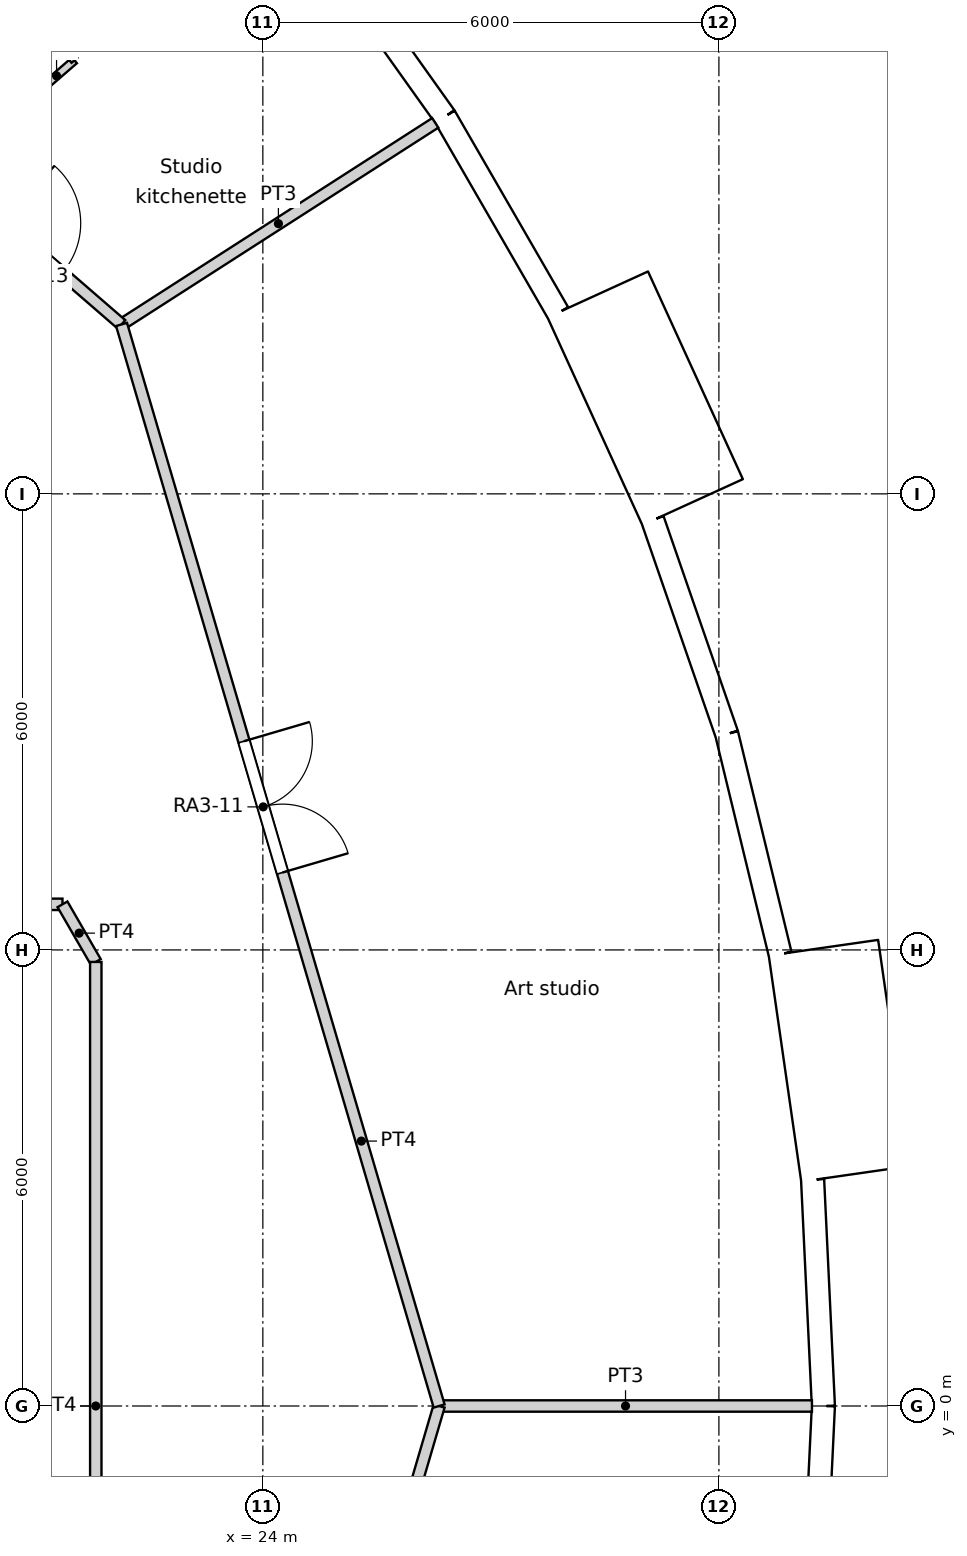
"""IFC4 building model, lengths in metres.
Left out: names, types, materials, properties, quantities, classifications, styles, units other than length and angle.
Written with IfcOpenShell. Run it as: python <this file> out.ifc"""

import sys

from ifc_helpers import new_model, si_unit, direction, frame, frame_2d, origin, origin_2d, place, context, subcontext, project, spatial, rectangle, circle, extrude, element, fill, save


model = new_model("IFC4")
c1 = context("Model", 3, precision=1e-05, world=origin(), true_north=direction((0.0, 1.0)))
c2 = subcontext(c1, "Body", "Model", "MODEL_VIEW")
j1 = project(units=[si_unit("LENGTHUNIT", "METRE"), si_unit("PLANEANGLEUNIT", "RADIAN")], contexts=[c1])
p1 = place(None, origin())
s1 = spatial("IfcSite", under=j1, at=p1, CompositionType="ELEMENT")
p2 = place(p1, origin())
s2 = spatial("IfcBuilding", under=s1, at=p2, CompositionType="ELEMENT")
p3 = place(p2, frame((0.0, 0.0, 49.8)))
s3 = spatial("IfcBuildingStorey", under=s2, at=p3, CompositionType="ELEMENT", Elevation=49.8)
for number, where, z_axis, x_axis in (
    (1, (30.275, 0.0, 0.0), (0.0, 0.0, 1.0), (1.0, 0.0, 0.0)),
    (2, (29.728, 5.729, 0.0), (0.0, 0.0, 1.0), (1.0, 0.0, 0.0)),
    (3, (28.106, 11.252, 0.0), (0.0, 0.0, 1.0), (1.0, 0.0, 0.0)),
    (4, (25.469, 16.368, 0.0), (0.0, 0.0, 1.0), (1.0, 0.0, 0.0)),
):
    element("IfcColumn", number, at=place(p3, frame(where, z_axis=z_axis, x_axis=x_axis)), inside=s3, PredefinedType="COLUMN", context=c2, shape_type="SweptSolid", body=[
        extrude(circle(Radius=0.7, at=origin_2d()), origin(), (0.0, 0.0, 1.0), 3.6),
    ])
for number, where, z_axis, x_axis in (
    (5, (24.548, 0.0, 0.0), (0.0, 0.0, 1.0), (1.0, 0.0, 0.0)),
    (6, (23.886, 5.661, 0.0), (0.0, 0.0, 1.0), (1.0, 0.0, 0.0)),
    (7, (21.937, 11.017, 0.0), (0.0, 0.0, 1.0), (1.0, 0.0, 0.0)),
):
    element("IfcColumn", number, at=place(p3, frame(where, z_axis=z_axis, x_axis=x_axis)), inside=s3, PredefinedType="COLUMN", context=c2, shape_type="SweptSolid", body=[
        extrude(circle(Radius=0.75, at=origin_2d()), origin(), (0.0, 0.0, 1.0), 3.6),
    ])
p4 = place(p3, frame((31.375, 0.0, 0.0), z_axis=(0.0, 0.0, 1.0), x_axis=(-0.047604077644, 0.998866283239, 0.0)))
e8 = element("IfcWall", 8, at=p4, inside=s3, PredefinedType="SOLIDWALL", context=c2, shape_type="SweptSolid", body=[
    extrude(rectangle(XDim=2.98, YDim=0.3, at=frame_2d((1.49, 0.0))), origin(), (0.0, 0.0, 1.0), 3.15),
])
p5 = place(p4, frame((1.49, 0.0, 1.55)))
e9 = element("IfcOpeningElement", 9, at=p5, cuts=e8, PredefinedType="OPENING", context=c2, shape_type="SweptSolid", body=[
    extrude(circle(Radius=0.9, at=origin_2d()), frame((0.0, 0.16, 0.0), z_axis=(0.0, -1.0, 0.0), x_axis=(1.0, 0.0, 0.0)), (0.0, 0.0, 1.0), 0.32),
])
p6 = place(p3, frame((31.802, 3.057, -0.45), z_axis=(0.0, 0.0, 1.0), x_axis=(-0.142332746704, 0.989818866872, 0.0)))
e10 = element("IfcWall", 10, at=p6, inside=s3, PredefinedType="ELEMENTEDWALL", context=c2, shape_type="SweptSolid", body=[
    extrude(rectangle(XDim=3.0, YDim=1.45, at=frame_2d((1.5, 0.0))), origin(), (0.0, 0.0, 1.0), 3.6),
])
p7 = place(p6, frame((1.5, 0.0, 2.0)))
e11 = element("IfcOpeningElement", 11, at=p7, cuts=e10, PredefinedType="OPENING", context=c2, shape_type="SweptSolid", body=[
    extrude(circle(Radius=0.9, at=origin_2d()), frame((0.0, 0.735, 0.0), z_axis=(0.0, -1.0, 0.0), x_axis=(1.0, 0.0, 0.0)), (0.0, 0.0, 1.0), 1.47),
])
p8 = place(p3, frame((30.806, 5.944, 0.0), z_axis=(0.0, 0.0, 1.0), x_axis=(-0.235743081534, 0.971815414319, 0.0)))
e12 = element("IfcWall", 12, at=p8, inside=s3, PredefinedType="SOLIDWALL", context=c2, shape_type="SweptSolid", body=[
    extrude(rectangle(XDim=2.979, YDim=0.3, at=frame_2d((1.49, 0.0))), origin(), (0.0, 0.0, 1.0), 3.15),
])
p9 = place(p8, frame((1.49, 0.0, 1.55)))
e13 = element("IfcOpeningElement", 13, at=p9, cuts=e12, PredefinedType="OPENING", context=c2, shape_type="SweptSolid", body=[
    extrude(circle(Radius=0.9, at=origin_2d()), frame((0.0, 0.16, 0.0), z_axis=(0.0, -1.0, 0.0), x_axis=(1.0, 0.0, 0.0)), (0.0, 0.0, 1.0), 0.32),
])
p10 = place(p3, frame((30.104, 8.839, 0.0), z_axis=(0.0, 0.0, 1.0), x_axis=(-0.327071167136, 0.944999709856, 0.0)))
e14 = element("IfcWall", 14, at=p10, inside=s3, PredefinedType="SOLIDWALL", context=c2, shape_type="SweptSolid", body=[
    extrude(rectangle(XDim=2.98, YDim=0.3, at=frame_2d((1.49, 0.0))), origin(), (0.0, 0.0, 1.0), 3.15),
])
p11 = place(p10, frame((1.49, 0.0, 1.55)))
e15 = element("IfcOpeningElement", 15, at=p11, cuts=e14, PredefinedType="OPENING", context=c2, shape_type="SweptSolid", body=[
    extrude(circle(Radius=0.9, at=origin_2d()), frame((0.0, 0.16, 0.0), z_axis=(0.0, -1.0, 0.0), x_axis=(1.0, 0.0, 0.0)), (0.0, 0.0, 1.0), 0.32),
])
p12 = place(p3, frame((29.653, 11.893, -0.45), z_axis=(0.0, 0.0, 1.0), x_axis=(-0.415427028395, 0.909626508012, 0.0)))
e16 = element("IfcWall", 16, at=p12, inside=s3, PredefinedType="ELEMENTEDWALL", context=c2, shape_type="SweptSolid", body=[
    extrude(rectangle(XDim=3.0, YDim=1.45, at=frame_2d((1.5, 0.0))), origin(), (0.0, 0.0, 1.0), 3.6),
])
p13 = place(p12, frame((1.5, 0.0, 2.0)))
e17 = element("IfcOpeningElement", 17, at=p13, cuts=e16, PredefinedType="OPENING", context=c2, shape_type="SweptSolid", body=[
    extrude(circle(Radius=0.9, at=origin_2d()), frame((0.0, 0.735, 0.0), z_axis=(0.0, -1.0, 0.0), x_axis=(1.0, 0.0, 0.0)), (0.0, 0.0, 1.0), 1.47),
])
p14 = place(p3, frame((27.884, 14.382, 0.0), z_axis=(0.0, 0.0, 1.0), x_axis=(-0.500025049464, 0.866010940986, 0.0)))
e18 = element("IfcWall", 18, at=p14, inside=s3, PredefinedType="SOLIDWALL", context=c2, shape_type="SweptSolid", body=[
    extrude(rectangle(XDim=2.98, YDim=0.3, at=frame_2d((1.49, 0.0))), origin(), (0.0, 0.0, 1.0), 3.15),
])
p15 = place(p14, frame((1.49, 0.0, 1.55)))
e19 = element("IfcOpeningElement", 19, at=p15, cuts=e18, PredefinedType="OPENING", context=c2, shape_type="SweptSolid", body=[
    extrude(circle(Radius=0.9, at=origin_2d()), frame((0.0, 0.16, 0.0), z_axis=(0.0, -1.0, 0.0), x_axis=(1.0, 0.0, 0.0)), (0.0, 0.0, 1.0), 0.32),
])
p16 = place(p3, frame((26.394, 16.962, 0.0), z_axis=(0.0, 0.0, 1.0), x_axis=(-0.580059407678, 0.81457417315, 0.0)))
e20 = element("IfcWall", 20, at=p16, inside=s3, PredefinedType="SOLIDWALL", context=c2, shape_type="SweptSolid", body=[
    extrude(rectangle(XDim=2.979, YDim=0.3, at=frame_2d((1.49, 0.0))), origin(), (0.0, 0.0, 1.0), 3.15),
])
p17 = place(p16, frame((1.49, 0.0, 1.55)))
e21 = element("IfcOpeningElement", 21, at=p17, cuts=e20, PredefinedType="OPENING", context=c2, shape_type="SweptSolid", body=[
    extrude(circle(Radius=0.9, at=origin_2d()), frame((0.0, 0.16, 0.0), z_axis=(0.0, -1.0, 0.0), x_axis=(1.0, 0.0, 0.0)), (0.0, 0.0, 1.0), 0.32),
])
p18 = place(p3, frame((31.233, -2.976, 0.0), z_axis=(0.0, 0.0, 1.0), x_axis=(0.047604077644, 0.998866283239, 0.0)))
e22 = element("IfcWall", 22, at=p18, inside=s3, PredefinedType="SOLIDWALL", context=c2, shape_type="SweptSolid", body=[
    extrude(rectangle(XDim=2.98, YDim=0.3, at=frame_2d((1.49, 0.0))), origin(), (0.0, 0.0, 1.0), 3.15),
])
p19 = place(p18, frame((1.49, 0.0, 1.55)))
e23 = element("IfcOpeningElement", 23, at=p19, cuts=e22, PredefinedType="OPENING", context=c2, shape_type="SweptSolid", body=[
    extrude(circle(Radius=0.9, at=origin_2d()), frame((0.0, 0.16, 0.0), z_axis=(0.0, -1.0, 0.0), x_axis=(1.0, 0.0, 0.0)), (0.0, 0.0, 1.0), 0.32),
])
p20 = place(p3, frame((21.802, -5.842, 0.0), z_axis=(0.0, 0.0, 1.0), x_axis=(0.0, 1.0, 0.0)))
e24 = element("IfcWall", 24, at=p20, inside=s3, PredefinedType="PARTITIONING", context=c2, shape_type="SweptSolid", body=[
    extrude(rectangle(XDim=11.684, YDim=0.15, at=frame_2d((5.842, 0.0))), origin(), (0.0, 0.0, 1.0), 3.15),
])
p21 = place(p3, frame((21.364, 6.6, 0.0), z_axis=(0.0, 0.0, 1.0), x_axis=(0.500277597875, -0.865865073245, 0.0)))
e25 = element("IfcWall", 25, at=p21, inside=s3, PredefinedType="PARTITIONING", context=c2, shape_type="SweptSolid", body=[
    extrude(rectangle(XDim=0.875, YDim=0.15, at=frame_2d((0.438, 0.0))), origin(), (0.0, 0.0, 1.0), 3.15),
])
p22 = place(p3, frame((15.8, 6.6, 0.0), z_axis=(0.0, 0.0, 1.0), x_axis=(1.0, 0.0, 0.0)))
e26 = element("IfcWall", 26, at=p22, inside=s3, PredefinedType="PARTITIONING", context=c2, shape_type="SweptSolid", body=[
    extrude(rectangle(XDim=5.564, YDim=0.15, at=frame_2d((2.782, 0.0))), origin(), (0.0, 0.0, 1.0), 3.15),
])
p23 = place(p3, frame((22.141, 14.229, 0.0), z_axis=(0.0, 0.0, 1.0), x_axis=(0.281730446162, -0.959493593363, 0.0)))
e27 = element("IfcWall", 27, at=p23, inside=s3, PredefinedType="PARTITIONING", context=c2, shape_type="SweptSolid", body=[
    extrude(rectangle(XDim=14.83, YDim=0.15, at=frame_2d((7.415, 0.0))), origin(), (0.0, 0.0, 1.0), 3.15),
])
p24 = place(p23, frame((5.715, 0.0, 0.0)))
e28 = element("IfcOpeningElement", 28, at=p24, cuts=e27, PredefinedType="OPENING", context=c2, shape_type="SweptSolid", body=[
    extrude(rectangle(XDim=1.8, YDim=2.1, at=frame_2d((0.9, 1.05))), frame((0.0, 0.075, 0.0), z_axis=(0.0, -1.0, 0.0), x_axis=(1.0, 0.0, 0.0)), (0.0, 0.0, 1.0), 0.15),
])
p25 = place(p3, frame((10.932, 23.939, 0.0), z_axis=(0.0, 0.0, 1.0), x_axis=(0.755838982892, -0.654757536757, 0.0)))
e29 = element("IfcWall", 29, at=p25, inside=s3, PredefinedType="PARTITIONING", context=c2, shape_type="SweptSolid", body=[
    extrude(rectangle(XDim=14.83, YDim=0.15, at=frame_2d((7.415, 0.0))), origin(), (0.0, 0.0, 1.0), 3.15),
])
p26 = place(p25, frame((12.796, 0.0, 0.0)))
e30 = element("IfcOpeningElement", 30, at=p26, cuts=e29, PredefinedType="OPENING", context=c2, shape_type="SweptSolid", body=[
    extrude(rectangle(XDim=1.0, YDim=2.1, at=frame_2d((0.5, 1.05))), frame((0.0, 0.075, 0.0), z_axis=(0.0, -1.0, 0.0), x_axis=(1.0, 0.0, 0.0)), (0.0, 0.0, 1.0), 0.15),
])
p27 = place(p25, frame((7.572, 0.0, 0.0)))
e31 = element("IfcOpeningElement", 31, at=p27, cuts=e29, PredefinedType="OPENING", context=c2, shape_type="SweptSolid", body=[
    extrude(rectangle(XDim=1.0, YDim=2.1, at=frame_2d((0.5, 1.05))), frame((0.0, 0.075, 0.0), z_axis=(0.0, -1.0, 0.0), x_axis=(1.0, 0.0, 0.0)), (0.0, 0.0, 1.0), 0.15),
])
p28 = place(p25, frame((1.033, 0.0, 0.0)))
e32 = element("IfcOpeningElement", 32, at=p28, cuts=e29, PredefinedType="OPENING", context=c2, shape_type="SweptSolid", body=[
    extrude(rectangle(XDim=1.0, YDim=2.1, at=frame_2d((0.5, 1.05))), frame((0.0, 0.075, 0.0), z_axis=(0.0, -1.0, 0.0), x_axis=(1.0, 0.0, 0.0)), (0.0, 0.0, 1.0), 0.15),
])
p29 = place(p3, frame((22.141, -14.229, 0.0), z_axis=(0.0, 0.0, 1.0), x_axis=(0.281730446162, 0.959493593363, 0.0)))
e33 = element("IfcWall", 33, at=p29, inside=s3, PredefinedType="PARTITIONING", context=c2, shape_type="SweptSolid", body=[
    extrude(rectangle(XDim=14.83, YDim=0.15, at=frame_2d((7.415, 0.0))), origin(), (0.0, 0.0, 1.0), 3.15),
])
p30 = place(p29, frame((6.515, 0.0, 0.0)))
e34 = element("IfcOpeningElement", 34, at=p30, cuts=e33, PredefinedType="OPENING", context=c2, shape_type="SweptSolid", body=[
    extrude(rectangle(XDim=1.0, YDim=2.04, at=frame_2d((0.5, 1.02))), frame((0.0, 0.075, 0.0), z_axis=(0.0, -1.0, 0.0), x_axis=(1.0, 0.0, 0.0)), (0.0, 0.0, 1.0), 0.15),
])
p31 = place(p3, frame((22.141, 14.229, 0.0), z_axis=(0.0, 0.0, 1.0), x_axis=(0.841325591791, 0.540528675093, 0.0)))
e35 = element("IfcWall", 35, at=p31, inside=s3, PredefinedType="PARTITIONING", context=c2, shape_type="SweptSolid", body=[
    extrude(rectangle(XDim=4.906, YDim=0.15, at=frame_2d((2.453, 0.0))), origin(), (0.0, 0.0, 1.0), 3.15),
])
p32 = place(p3, frame((26.319, 0.0, 0.0), z_axis=(0.0, 0.0, 1.0), x_axis=(1.0, 0.0, 0.0)))
e36 = element("IfcWall", 36, at=p32, inside=s3, PredefinedType="PARTITIONING", context=c2, shape_type="SweptSolid", body=[
    extrude(rectangle(XDim=4.905, YDim=0.15, at=frame_2d((2.453, 0.0))), origin(), (0.0, 0.0, 1.0), 3.15),
])
p33 = place(p3, frame((19.826, 16.234, 0.0), z_axis=(0.0, 0.0, 1.0), x_axis=(0.755703447798, 0.654913963042, 0.0)))
e37 = element("IfcWall", 37, at=p33, inside=s3, PredefinedType="PARTITIONING", context=c2, shape_type="SweptSolid", body=[
    extrude(rectangle(XDim=2.243, YDim=0.1, at=frame_2d((1.122, 0.0))), origin(), (0.0, 0.0, 1.0), 3.15),
])
p34 = place(p33, frame((0.671, 0.0, 0.0)))
e38 = element("IfcOpeningElement", 38, at=p34, cuts=e37, PredefinedType="OPENING", context=c2, shape_type="SweptSolid", body=[
    extrude(rectangle(XDim=0.9, YDim=2.04, at=frame_2d((0.45, 1.02))), frame((0.0, 0.05, 0.0), z_axis=(0.0, -1.0, 0.0), x_axis=(1.0, 0.0, 0.0)), (0.0, 0.0, 1.0), 0.1),
])
p35 = place(p3, frame((20.184, 19.245, 0.0), z_axis=(0.0, 0.0, 1.0), x_axis=(0.655017058368, -0.755614090159, 0.0)))
e39 = element("IfcWall", 39, at=p35, inside=s3, PredefinedType="PARTITIONING", context=c2, shape_type="SweptSolid", body=[
    extrude(rectangle(XDim=2.041, YDim=0.1, at=frame_2d((1.021, 0.0))), origin(), (0.0, 0.0, 1.0), 3.15),
])
p36 = place(p3, frame((18.36, 17.505, 0.0), z_axis=(0.0, 0.0, 1.0), x_axis=(0.723605349213, 0.690213951315, 0.0)))
e40 = element("IfcWall", 40, at=p36, inside=s3, PredefinedType="PARTITIONING", context=c2, shape_type="SweptSolid", body=[
    extrude(rectangle(XDim=5.856, YDim=0.15, at=frame_2d((2.928, 0.0))), origin(), (0.0, 0.0, 1.0), 3.15),
])
p37 = place(p5, origin())
e41 = element("IfcWindow", 41, at=p37, inside=s3, PartitioningType="SINGLE_PANEL", PredefinedType="WINDOW", context=c2, shape_type="SweptSolid", body=[
    extrude(circle(Radius=0.9, at=origin_2d()), frame((0.0, 0.12, 0.0), z_axis=(0.0, -1.0, 0.0), x_axis=(1.0, 0.0, 0.0)), (0.0, 0.0, 1.0), 0.1),
])
fill(e9, e41)
p38 = place(p7, origin())
e42 = element("IfcWindow", 42, at=p38, inside=s3, PartitioningType="SINGLE_PANEL", PredefinedType="WINDOW", context=c2, shape_type="SweptSolid", body=[
    extrude(circle(Radius=0.9, at=origin_2d()), frame((0.0, 0.695, 0.0), z_axis=(0.0, -1.0, 0.0), x_axis=(1.0, 0.0, 0.0)), (0.0, 0.0, 1.0), 0.1),
])
fill(e11, e42)
p39 = place(p9, origin())
e43 = element("IfcWindow", 43, at=p39, inside=s3, PartitioningType="SINGLE_PANEL", PredefinedType="WINDOW", context=c2, shape_type="SweptSolid", body=[
    extrude(circle(Radius=0.9, at=origin_2d()), frame((0.0, 0.12, 0.0), z_axis=(0.0, -1.0, 0.0), x_axis=(1.0, 0.0, 0.0)), (0.0, 0.0, 1.0), 0.1),
])
fill(e13, e43)
p40 = place(p11, origin())
e44 = element("IfcWindow", 44, at=p40, inside=s3, PartitioningType="SINGLE_PANEL", PredefinedType="WINDOW", context=c2, shape_type="SweptSolid", body=[
    extrude(circle(Radius=0.9, at=origin_2d()), frame((0.0, 0.12, 0.0), z_axis=(0.0, -1.0, 0.0), x_axis=(1.0, 0.0, 0.0)), (0.0, 0.0, 1.0), 0.1),
])
fill(e15, e44)
p41 = place(p13, origin())
e45 = element("IfcWindow", 45, at=p41, inside=s3, PartitioningType="SINGLE_PANEL", PredefinedType="WINDOW", context=c2, shape_type="SweptSolid", body=[
    extrude(circle(Radius=0.9, at=origin_2d()), frame((0.0, 0.695, 0.0), z_axis=(0.0, -1.0, 0.0), x_axis=(1.0, 0.0, 0.0)), (0.0, 0.0, 1.0), 0.1),
])
fill(e17, e45)
p42 = place(p15, origin())
e46 = element("IfcWindow", 46, at=p42, inside=s3, PartitioningType="SINGLE_PANEL", PredefinedType="WINDOW", context=c2, shape_type="SweptSolid", body=[
    extrude(circle(Radius=0.9, at=origin_2d()), frame((0.0, 0.12, 0.0), z_axis=(0.0, -1.0, 0.0), x_axis=(1.0, 0.0, 0.0)), (0.0, 0.0, 1.0), 0.1),
])
fill(e19, e46)
p43 = place(p17, origin())
e47 = element("IfcWindow", 47, at=p43, inside=s3, PartitioningType="SINGLE_PANEL", PredefinedType="WINDOW", context=c2, shape_type="SweptSolid", body=[
    extrude(circle(Radius=0.9, at=origin_2d()), frame((0.0, 0.12, 0.0), z_axis=(0.0, -1.0, 0.0), x_axis=(1.0, 0.0, 0.0)), (0.0, 0.0, 1.0), 0.1),
])
fill(e21, e47)
p44 = place(p19, origin())
e48 = element("IfcWindow", 48, at=p44, inside=s3, PartitioningType="SINGLE_PANEL", PredefinedType="WINDOW", context=c2, shape_type="SweptSolid", body=[
    extrude(circle(Radius=0.9, at=origin_2d()), frame((0.0, 0.12, 0.0), z_axis=(0.0, -1.0, 0.0), x_axis=(1.0, 0.0, 0.0)), (0.0, 0.0, 1.0), 0.1),
])
fill(e23, e48)
p45 = place(p24, origin())
e49 = element("IfcDoor", 49, at=p45, inside=s3, OperationType="DOUBLE_DOOR_SINGLE_SWING", PredefinedType="DOOR", context=c2, shape_type="SweptSolid", body=[
    extrude(rectangle(XDim=1.8, YDim=2.1, at=frame_2d((0.9, 1.05))), frame((0.0, 0.025, 0.0), z_axis=(0.0, -1.0, 0.0), x_axis=(1.0, 0.0, 0.0)), (0.0, 0.0, 1.0), 0.05),
])
fill(e28, e49)
p46 = place(p26, origin())
e50 = element("IfcDoor", 50, at=p46, inside=s3, OperationType="SINGLE_SWING_LEFT", PredefinedType="DOOR", context=c2, shape_type="SweptSolid", body=[
    extrude(rectangle(XDim=1.0, YDim=2.1, at=frame_2d((0.5, 1.05))), frame((0.0, 0.025, 0.0), z_axis=(0.0, -1.0, 0.0), x_axis=(1.0, 0.0, 0.0)), (0.0, 0.0, 1.0), 0.05),
])
fill(e30, e50)
save(model, sys.argv[1])
